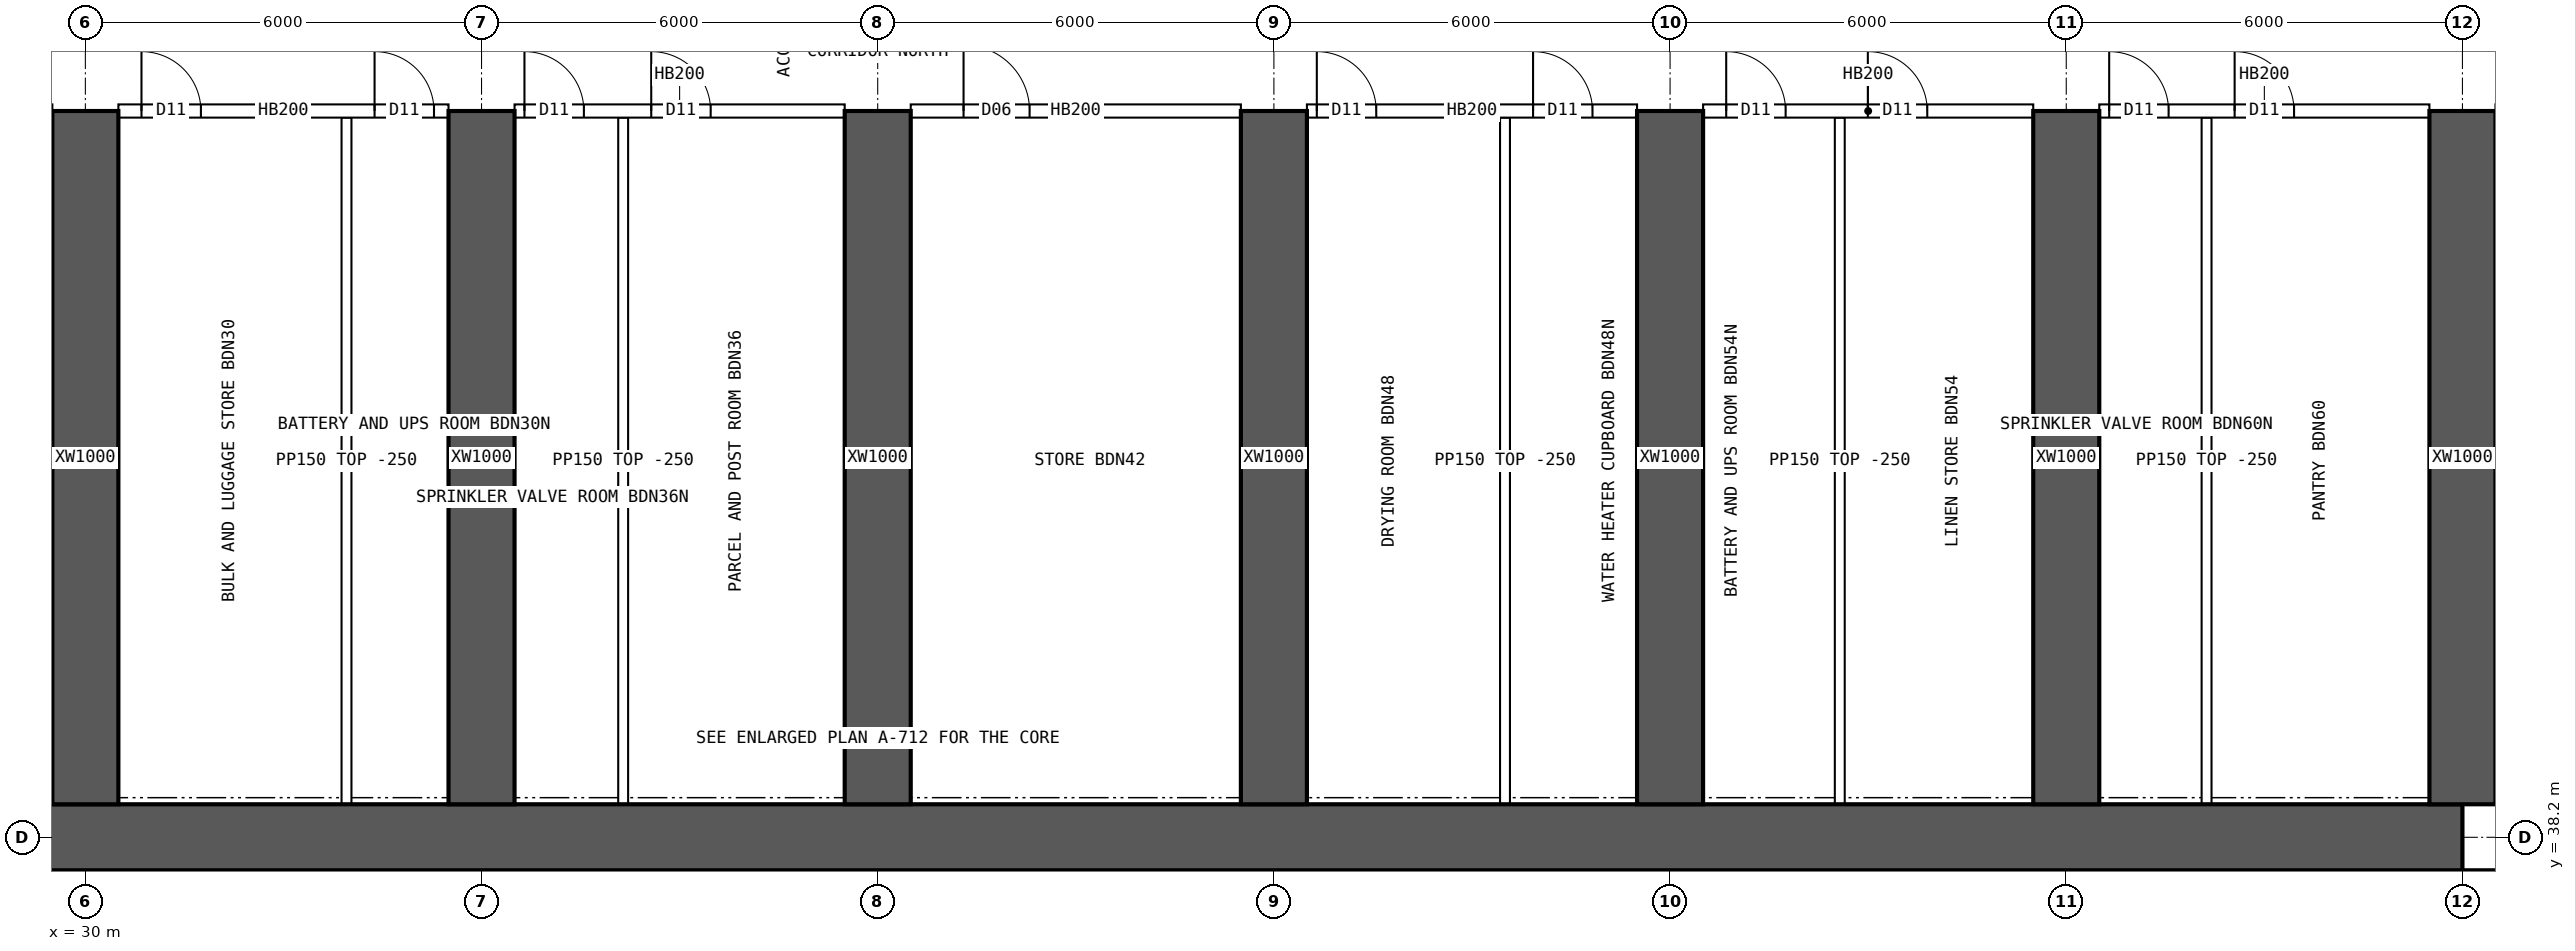
"""IFC4 building model, lengths in metres.
Left out: names, types, materials, properties, quantities, classifications, styles, units other than length and angle.
Written with IfcOpenShell. Run it as: python <this file> out.ifc"""

import sys

from ifc_helpers import new_model, si_unit, direction, frame, frame_2d, origin, place, context, subcontext, project, spatial, rectangle, extrude, element, fill, save


model = new_model("IFC4")
c1 = context("Model", 3, precision=1e-05, world=origin(), true_north=direction((0.0, 1.0)))
c2 = subcontext(c1, "Body", "Model", "MODEL_VIEW")
j1 = project(units=[si_unit("LENGTHUNIT", "METRE"), si_unit("PLANEANGLEUNIT", "RADIAN")], contexts=[c1])
p1 = place(None, origin())
s1 = spatial("IfcSite", under=j1, at=p1, CompositionType="ELEMENT")
p2 = place(p1, origin())
s2 = spatial("IfcBuilding", under=s1, at=p2, CompositionType="ELEMENT")
p3 = place(p2, frame((0.0, 0.0, 38.95)))
s3 = spatial("IfcBuildingStorey", under=s2, at=p3, CompositionType="ELEMENT", Elevation=38.95)
p4 = place(p3, frame((18.0, 38.2, 0.0), z_axis=(0.0, 0.0, 1.0), x_axis=(1.0, 0.0, 0.0)))
e1 = element("IfcWall", 1, at=p4, inside=s3, PredefinedType="SHEAR", context=c2, shape_type="SweptSolid", body=[
    extrude(rectangle(XDim=48.0, YDim=1.0, at=frame_2d((24.0, 0.0))), origin(), (0.0, 0.0, 1.0), 3.75),
])
for number, where, z_axis, x_axis in (
    (2, (62.4, 34.75, 0.0), (0.0, 0.0, 1.0), (0.0, 1.0, 0.0)),
    (3, (58.0, 34.75, 0.0), (0.0, 0.0, 1.0), (0.0, 1.0, 0.0)),
):
    element("IfcWall", number, at=place(p3, frame(where, z_axis=z_axis, x_axis=x_axis)), inside=s3, PredefinedType="SHEAR", context=c2, shape_type="SweptSolid", body=[
        extrude(rectangle(XDim=2.95, YDim=0.3, at=frame_2d((1.475, 0.0))), origin(), (0.0, 0.0, 1.0), 3.75),
    ])
for number, where, z_axis, x_axis in (
    (4, (30.0, 38.7, 0.0), (0.0, 0.0, 1.0), (0.0, 1.0, 0.0)),
    (5, (36.0, 38.7, 0.0), (0.0, 0.0, 1.0), (0.0, 1.0, 0.0)),
    (6, (42.0, 38.7, 0.0), (0.0, 0.0, 1.0), (0.0, 1.0, 0.0)),
    (7, (48.0, 38.7, 0.0), (0.0, 0.0, 1.0), (0.0, 1.0, 0.0)),
    (8, (54.0, 38.7, 0.0), (0.0, 0.0, 1.0), (0.0, 1.0, 0.0)),
    (9, (60.0, 38.7, 0.0), (0.0, 0.0, 1.0), (0.0, 1.0, 0.0)),
    (10, (66.0, 38.7, 0.0), (0.0, 0.0, 1.0), (0.0, 1.0, 0.0)),
):
    element("IfcWall", number, at=place(p3, frame(where, z_axis=z_axis, x_axis=x_axis)), inside=s3, PredefinedType="SHEAR", context=c2, shape_type="SweptSolid", body=[
        extrude(rectangle(XDim=10.5, YDim=1.0, at=frame_2d((5.25, 0.0))), origin(), (0.0, 0.0, 1.0), 3.75),
    ])
for number, where, z_axis, x_axis in (
    (11, (29.651, 34.75, 0.0), (0.0, 0.0, 1.0), (0.0, 1.0, 0.0)),
    (12, (33.946, 34.75, 0.0), (0.0, 0.0, 1.0), (0.0, 1.0, 0.0)),
    (13, (36.946, 34.75, 0.0), (0.0, 0.0, 1.0), (0.0, 1.0, 0.0)),
    (14, (41.463, 34.75, 0.0), (0.0, 0.0, 1.0), (0.0, 1.0, 0.0)),
    (15, (45.758, 34.75, 0.0), (0.0, 0.0, 1.0), (0.0, 1.0, 0.0)),
    (16, (47.058, 34.75, 0.0), (0.0, 0.0, 1.0), (0.0, 1.0, 0.0)),
):
    element("IfcWall", number, at=place(p3, frame(where, z_axis=z_axis, x_axis=x_axis)), inside=s3, PredefinedType="SOLIDWALL", context=c2, shape_type="SweptSolid", body=[
        extrude(rectangle(XDim=2.95, YDim=0.15, at=frame_2d((1.475, 0.0))), origin(), (0.0, 0.0, 1.0), 3.5),
    ])
p5 = place(p3, frame((30.5, 49.2, 0.0), z_axis=(0.0, 0.0, 1.0), x_axis=(1.0, 0.0, 0.0)))
e17 = element("IfcWall", 17, at=p5, inside=s3, PredefinedType="SOLIDWALL", context=c2, shape_type="SweptSolid", body=[
    extrude(rectangle(XDim=5.0, YDim=0.2, at=frame_2d((2.5, 0.0))), origin(), (0.0, 0.0, 1.0), 3.5),
])
p6 = place(p5, frame((0.35, 0.0, 0.0)))
e18 = element("IfcOpeningElement", 18, at=p6, cuts=e17, PredefinedType="OPENING", context=c2, shape_type="SweptSolid", body=[
    extrude(rectangle(XDim=0.9, YDim=2.1, at=frame_2d((0.45, 1.05))), frame((0.0, 0.11, 0.0), z_axis=(0.0, -1.0, 0.0), x_axis=(1.0, 0.0, 0.0)), (0.0, 0.0, 1.0), 0.22),
])
p7 = place(p5, frame((3.88, 0.0, 0.0)))
e19 = element("IfcOpeningElement", 19, at=p7, cuts=e17, PredefinedType="OPENING", context=c2, shape_type="SweptSolid", body=[
    extrude(rectangle(XDim=0.9, YDim=2.1, at=frame_2d((0.45, 1.05))), frame((0.0, 0.11, 0.0), z_axis=(0.0, -1.0, 0.0), x_axis=(1.0, 0.0, 0.0)), (0.0, 0.0, 1.0), 0.22),
])
p8 = place(p3, frame((36.5, 49.2, 0.0), z_axis=(0.0, 0.0, 1.0), x_axis=(1.0, 0.0, 0.0)))
e20 = element("IfcWall", 20, at=p8, inside=s3, PredefinedType="SOLIDWALL", context=c2, shape_type="SweptSolid", body=[
    extrude(rectangle(XDim=5.0, YDim=0.2, at=frame_2d((2.5, 0.0))), origin(), (0.0, 0.0, 1.0), 3.5),
])
p9 = place(p8, frame((0.15, 0.0, 0.0)))
e21 = element("IfcOpeningElement", 21, at=p9, cuts=e20, PredefinedType="OPENING", context=c2, shape_type="SweptSolid", body=[
    extrude(rectangle(XDim=0.9, YDim=2.1, at=frame_2d((0.45, 1.05))), frame((0.0, 0.11, 0.0), z_axis=(0.0, -1.0, 0.0), x_axis=(1.0, 0.0, 0.0)), (0.0, 0.0, 1.0), 0.22),
])
p10 = place(p8, frame((2.07, 0.0, 0.0)))
e22 = element("IfcOpeningElement", 22, at=p10, cuts=e20, PredefinedType="OPENING", context=c2, shape_type="SweptSolid", body=[
    extrude(rectangle(XDim=0.9, YDim=2.1, at=frame_2d((0.45, 1.05))), frame((0.0, 0.11, 0.0), z_axis=(0.0, -1.0, 0.0), x_axis=(1.0, 0.0, 0.0)), (0.0, 0.0, 1.0), 0.22),
])
p11 = place(p3, frame((42.5, 49.2, 0.0), z_axis=(0.0, 0.0, 1.0), x_axis=(1.0, 0.0, 0.0)))
e23 = element("IfcWall", 23, at=p11, inside=s3, PredefinedType="SOLIDWALL", context=c2, shape_type="SweptSolid", body=[
    extrude(rectangle(XDim=5.0, YDim=0.2, at=frame_2d((2.5, 0.0))), origin(), (0.0, 0.0, 1.0), 3.5),
])
p12 = place(p11, frame((0.8, 0.0, 0.0)))
e24 = element("IfcOpeningElement", 24, at=p12, cuts=e23, PredefinedType="OPENING", context=c2, shape_type="SweptSolid", body=[
    extrude(rectangle(XDim=1.0, YDim=2.1, at=frame_2d((0.5, 1.05))), frame((0.0, 0.11, 0.0), z_axis=(0.0, -1.0, 0.0), x_axis=(1.0, 0.0, 0.0)), (0.0, 0.0, 1.0), 0.22),
])
p13 = place(p3, frame((48.5, 49.2, 0.0), z_axis=(0.0, 0.0, 1.0), x_axis=(1.0, 0.0, 0.0)))
e25 = element("IfcWall", 25, at=p13, inside=s3, PredefinedType="SOLIDWALL", context=c2, shape_type="SweptSolid", body=[
    extrude(rectangle(XDim=5.0, YDim=0.2, at=frame_2d((2.5, 0.0))), origin(), (0.0, 0.0, 1.0), 3.5),
])
p14 = place(p13, frame((0.15, 0.0, 0.0)))
e26 = element("IfcOpeningElement", 26, at=p14, cuts=e25, PredefinedType="OPENING", context=c2, shape_type="SweptSolid", body=[
    extrude(rectangle(XDim=0.9, YDim=2.1, at=frame_2d((0.45, 1.05))), frame((0.0, 0.11, 0.0), z_axis=(0.0, -1.0, 0.0), x_axis=(1.0, 0.0, 0.0)), (0.0, 0.0, 1.0), 0.22),
])
p15 = place(p13, frame((3.425, 0.0, 0.0)))
e27 = element("IfcOpeningElement", 27, at=p15, cuts=e25, PredefinedType="OPENING", context=c2, shape_type="SweptSolid", body=[
    extrude(rectangle(XDim=0.9, YDim=2.1, at=frame_2d((0.45, 1.05))), frame((0.0, 0.11, 0.0), z_axis=(0.0, -1.0, 0.0), x_axis=(1.0, 0.0, 0.0)), (0.0, 0.0, 1.0), 0.22),
])
p16 = place(p3, frame((54.5, 49.2, 0.0), z_axis=(0.0, 0.0, 1.0), x_axis=(1.0, 0.0, 0.0)))
e28 = element("IfcWall", 28, at=p16, inside=s3, PredefinedType="SOLIDWALL", context=c2, shape_type="SweptSolid", body=[
    extrude(rectangle(XDim=5.0, YDim=0.2, at=frame_2d((2.5, 0.0))), origin(), (0.0, 0.0, 1.0), 3.5),
])
p17 = place(p16, frame((0.35, 0.0, 0.0)))
e29 = element("IfcOpeningElement", 29, at=p17, cuts=e28, PredefinedType="OPENING", context=c2, shape_type="SweptSolid", body=[
    extrude(rectangle(XDim=0.9, YDim=2.1, at=frame_2d((0.45, 1.05))), frame((0.0, 0.11, 0.0), z_axis=(0.0, -1.0, 0.0), x_axis=(1.0, 0.0, 0.0)), (0.0, 0.0, 1.0), 0.22),
])
p18 = place(p16, frame((2.495, 0.0, 0.0)))
e30 = element("IfcOpeningElement", 30, at=p18, cuts=e28, PredefinedType="OPENING", context=c2, shape_type="SweptSolid", body=[
    extrude(rectangle(XDim=0.9, YDim=2.1, at=frame_2d((0.45, 1.05))), frame((0.0, 0.11, 0.0), z_axis=(0.0, -1.0, 0.0), x_axis=(1.0, 0.0, 0.0)), (0.0, 0.0, 1.0), 0.22),
])
p19 = place(p3, frame((60.5, 49.2, 0.0), z_axis=(0.0, 0.0, 1.0), x_axis=(1.0, 0.0, 0.0)))
e31 = element("IfcWall", 31, at=p19, inside=s3, PredefinedType="SOLIDWALL", context=c2, shape_type="SweptSolid", body=[
    extrude(rectangle(XDim=5.0, YDim=0.2, at=frame_2d((2.5, 0.0))), origin(), (0.0, 0.0, 1.0), 3.5),
])
p20 = place(p19, frame((0.15, 0.0, 0.0)))
e32 = element("IfcOpeningElement", 32, at=p20, cuts=e31, PredefinedType="OPENING", context=c2, shape_type="SweptSolid", body=[
    extrude(rectangle(XDim=0.9, YDim=2.1, at=frame_2d((0.45, 1.05))), frame((0.0, 0.11, 0.0), z_axis=(0.0, -1.0, 0.0), x_axis=(1.0, 0.0, 0.0)), (0.0, 0.0, 1.0), 0.22),
])
p21 = place(p19, frame((2.05, 0.0, 0.0)))
e33 = element("IfcOpeningElement", 33, at=p21, cuts=e31, PredefinedType="OPENING", context=c2, shape_type="SweptSolid", body=[
    extrude(rectangle(XDim=0.9, YDim=2.1, at=frame_2d((0.45, 1.05))), frame((0.0, 0.11, 0.0), z_axis=(0.0, -1.0, 0.0), x_axis=(1.0, 0.0, 0.0)), (0.0, 0.0, 1.0), 0.22),
])
for number, where, z_axis, x_axis in (
    (34, (33.955, 38.7, 0.0), (0.0, 0.0, 1.0), (0.0, 1.0, 0.0)),
    (35, (38.145, 38.7, 0.0), (0.0, 0.0, 1.0), (0.0, 1.0, 0.0)),
    (36, (51.5, 38.7, 0.0), (0.0, 0.0, 1.0), (0.0, 1.0, 0.0)),
    (37, (56.57, 38.7, 0.0), (0.0, 0.0, 1.0), (0.0, 1.0, 0.0)),
    (38, (62.125, 38.7, 0.0), (0.0, 0.0, 1.0), (0.0, 1.0, 0.0)),
):
    element("IfcWall", number, at=place(p3, frame(where, z_axis=z_axis, x_axis=x_axis)), inside=s3, PredefinedType="PARTITIONING", context=c2, shape_type="SweptSolid", body=[
        extrude(rectangle(XDim=10.4, YDim=0.15, at=frame_2d((5.2, 0.0))), origin(), (0.0, 0.0, 1.0), 3.5),
    ])
p22 = place(p6, origin())
e39 = element("IfcDoor", 39, at=p22, inside=s3, OperationType="SINGLE_SWING_LEFT", PredefinedType="DOOR", context=c2, shape_type="SweptSolid", body=[
    extrude(rectangle(XDim=0.9, YDim=2.1, at=frame_2d((0.45, 1.05))), frame((0.0, 0.025, 0.0), z_axis=(0.0, -1.0, 0.0), x_axis=(1.0, 0.0, 0.0)), (0.0, 0.0, 1.0), 0.05),
])
fill(e18, e39)
p23 = place(p7, origin())
e40 = element("IfcDoor", 40, at=p23, inside=s3, OperationType="SINGLE_SWING_LEFT", PredefinedType="DOOR", context=c2, shape_type="SweptSolid", body=[
    extrude(rectangle(XDim=0.9, YDim=2.1, at=frame_2d((0.45, 1.05))), frame((0.0, 0.025, 0.0), z_axis=(0.0, -1.0, 0.0), x_axis=(1.0, 0.0, 0.0)), (0.0, 0.0, 1.0), 0.05),
])
fill(e19, e40)
p24 = place(p9, origin())
e41 = element("IfcDoor", 41, at=p24, inside=s3, OperationType="SINGLE_SWING_LEFT", PredefinedType="DOOR", context=c2, shape_type="SweptSolid", body=[
    extrude(rectangle(XDim=0.9, YDim=2.1, at=frame_2d((0.45, 1.05))), frame((0.0, 0.025, 0.0), z_axis=(0.0, -1.0, 0.0), x_axis=(1.0, 0.0, 0.0)), (0.0, 0.0, 1.0), 0.05),
])
fill(e21, e41)
p25 = place(p10, origin())
e42 = element("IfcDoor", 42, at=p25, inside=s3, OperationType="SINGLE_SWING_LEFT", PredefinedType="DOOR", context=c2, shape_type="SweptSolid", body=[
    extrude(rectangle(XDim=0.9, YDim=2.1, at=frame_2d((0.45, 1.05))), frame((0.0, 0.025, 0.0), z_axis=(0.0, -1.0, 0.0), x_axis=(1.0, 0.0, 0.0)), (0.0, 0.0, 1.0), 0.05),
])
fill(e22, e42)
p26 = place(p12, origin())
e43 = element("IfcDoor", 43, at=p26, inside=s3, OperationType="SINGLE_SWING_LEFT", PredefinedType="DOOR", context=c2, shape_type="SweptSolid", body=[
    extrude(rectangle(XDim=1.0, YDim=2.1, at=frame_2d((0.5, 1.05))), frame((0.0, 0.025, 0.0), z_axis=(0.0, -1.0, 0.0), x_axis=(1.0, 0.0, 0.0)), (0.0, 0.0, 1.0), 0.05),
])
fill(e24, e43)
p27 = place(p14, origin())
e44 = element("IfcDoor", 44, at=p27, inside=s3, OperationType="SINGLE_SWING_LEFT", PredefinedType="DOOR", context=c2, shape_type="SweptSolid", body=[
    extrude(rectangle(XDim=0.9, YDim=2.1, at=frame_2d((0.45, 1.05))), frame((0.0, 0.025, 0.0), z_axis=(0.0, -1.0, 0.0), x_axis=(1.0, 0.0, 0.0)), (0.0, 0.0, 1.0), 0.05),
])
fill(e26, e44)
p28 = place(p15, origin())
e45 = element("IfcDoor", 45, at=p28, inside=s3, OperationType="SINGLE_SWING_LEFT", PredefinedType="DOOR", context=c2, shape_type="SweptSolid", body=[
    extrude(rectangle(XDim=0.9, YDim=2.1, at=frame_2d((0.45, 1.05))), frame((0.0, 0.025, 0.0), z_axis=(0.0, -1.0, 0.0), x_axis=(1.0, 0.0, 0.0)), (0.0, 0.0, 1.0), 0.05),
])
fill(e27, e45)
p29 = place(p17, origin())
e46 = element("IfcDoor", 46, at=p29, inside=s3, OperationType="SINGLE_SWING_LEFT", PredefinedType="DOOR", context=c2, shape_type="SweptSolid", body=[
    extrude(rectangle(XDim=0.9, YDim=2.1, at=frame_2d((0.45, 1.05))), frame((0.0, 0.025, 0.0), z_axis=(0.0, -1.0, 0.0), x_axis=(1.0, 0.0, 0.0)), (0.0, 0.0, 1.0), 0.05),
])
fill(e29, e46)
p30 = place(p18, origin())
e47 = element("IfcDoor", 47, at=p30, inside=s3, OperationType="SINGLE_SWING_LEFT", PredefinedType="DOOR", context=c2, shape_type="SweptSolid", body=[
    extrude(rectangle(XDim=0.9, YDim=2.1, at=frame_2d((0.45, 1.05))), frame((0.0, 0.025, 0.0), z_axis=(0.0, -1.0, 0.0), x_axis=(1.0, 0.0, 0.0)), (0.0, 0.0, 1.0), 0.05),
])
fill(e30, e47)
p31 = place(p20, origin())
e48 = element("IfcDoor", 48, at=p31, inside=s3, OperationType="SINGLE_SWING_LEFT", PredefinedType="DOOR", context=c2, shape_type="SweptSolid", body=[
    extrude(rectangle(XDim=0.9, YDim=2.1, at=frame_2d((0.45, 1.05))), frame((0.0, 0.025, 0.0), z_axis=(0.0, -1.0, 0.0), x_axis=(1.0, 0.0, 0.0)), (0.0, 0.0, 1.0), 0.05),
])
fill(e32, e48)
p32 = place(p21, origin())
e49 = element("IfcDoor", 49, at=p32, inside=s3, OperationType="SINGLE_SWING_LEFT", PredefinedType="DOOR", context=c2, shape_type="SweptSolid", body=[
    extrude(rectangle(XDim=0.9, YDim=2.1, at=frame_2d((0.45, 1.05))), frame((0.0, 0.025, 0.0), z_axis=(0.0, -1.0, 0.0), x_axis=(1.0, 0.0, 0.0)), (0.0, 0.0, 1.0), 0.05),
])
fill(e33, e49)
save(model, sys.argv[1])
